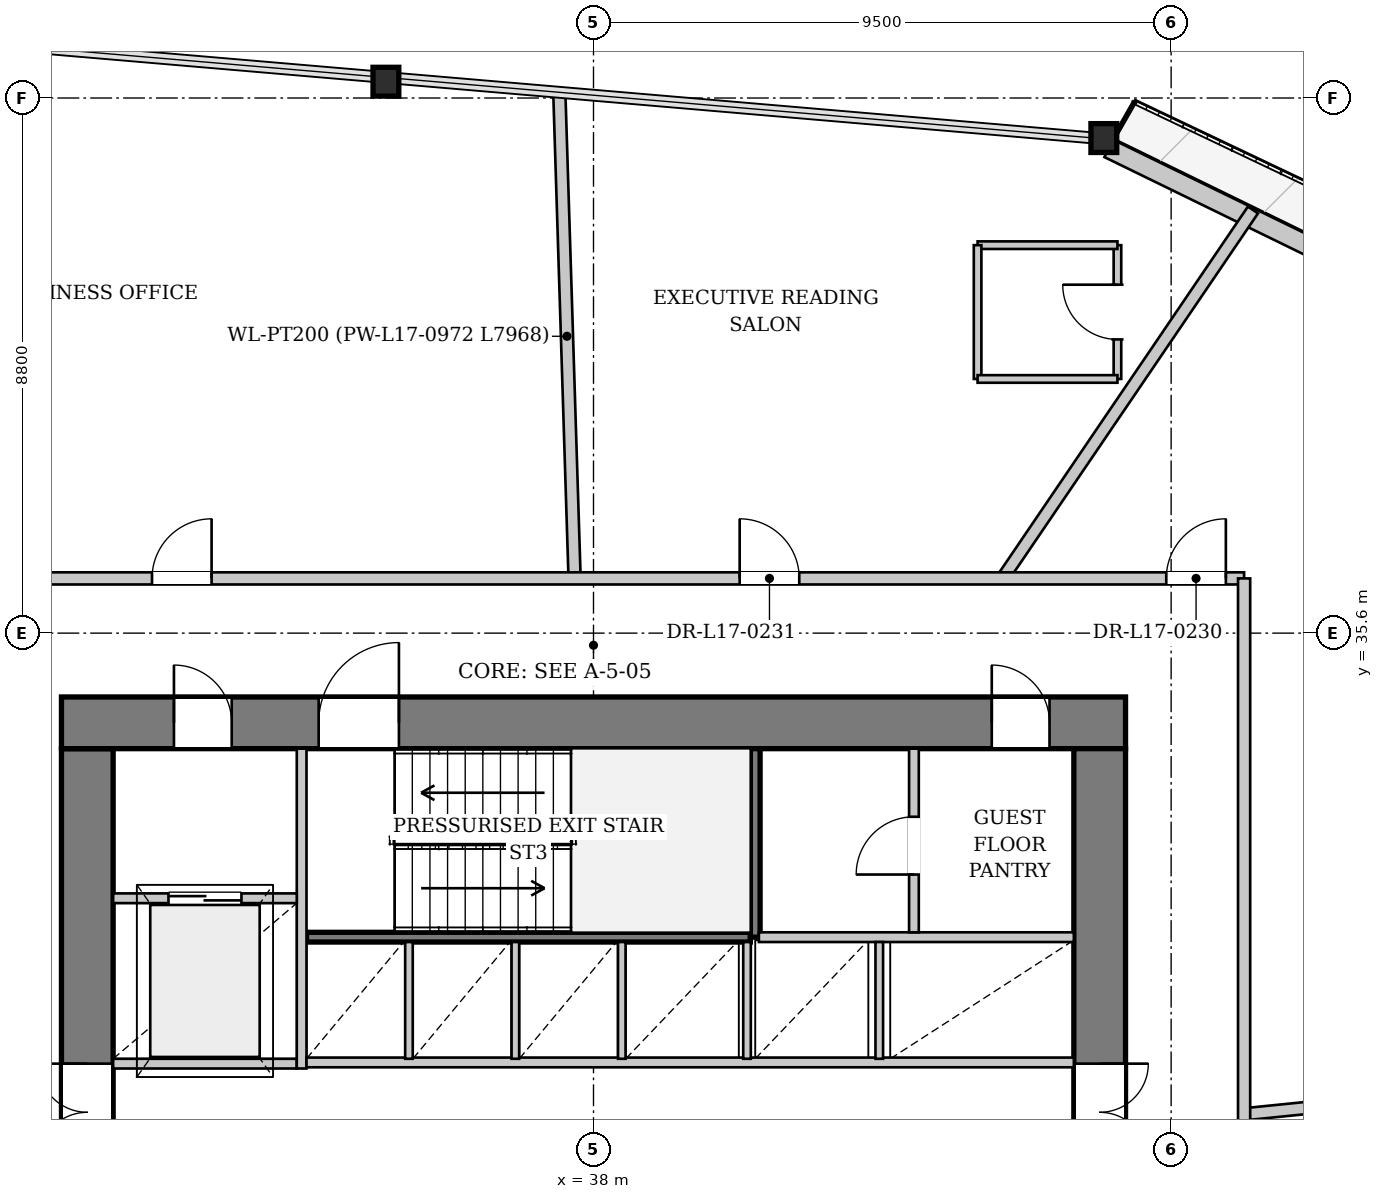
"""IFC4 building model, lengths in metres.
Left out: names, types, materials, properties, quantities, classifications, styles, units other than length and angle.
Written with IfcOpenShell. Run it as: python <this file> out.ifc"""

import sys

from ifc_helpers import new_model, si_unit, direction, frame, frame_2d, origin, origin_2d, place, context, subcontext, project, spatial, rectangle, i_section, extrude, source, transform, mapped, element, fill, save


model = new_model("IFC4")
c1 = context("Model", 3, precision=1e-05, world=origin(), true_north=direction((0.0, 1.0)))
c2 = subcontext(c1, "Body", "Model", "MODEL_VIEW")
j1 = project(units=[si_unit("LENGTHUNIT", "METRE"), si_unit("PLANEANGLEUNIT", "RADIAN")], contexts=[c1])
p1 = place(None, origin())
s1 = spatial("IfcSite", under=j1, at=p1, CompositionType="ELEMENT")
p2 = place(p1, origin())
s2 = spatial("IfcBuilding", under=s1, at=p2, CompositionType="ELEMENT")
p3 = place(p2, frame((0.0, 0.0, 68.35)))
s3 = spatial("IfcBuildingStorey", under=s2, at=p3, CompositionType="ELEMENT", Elevation=68.35)
m1 = source(origin(), c2, "Body", "SweptSolid", [
    extrude(i_section(OverallWidth=0.424, OverallDepth=0.474, WebThickness=0.043, FlangeThickness=0.068, at=origin_2d()), origin(), (0.0, 0.0, 1.0), 3.399),
])
p4 = place(p3, frame((46.543, 43.716, 0.0), z_axis=(-0.088355592773, 0.01501326739, 0.995975848617), x_axis=(-0.167517592781, -0.985869086699, 0.0)))
e1 = element("IfcColumn", 1, at=p4, inside=s3, PredefinedType="COLUMN", context=c2, shape_type="MappedRepresentation", body=[
    mapped(m1, transform((0.0, 0.0, 0.0), x_axis=(1.0, 0.0, 0.0), y_axis=(0.0, 1.0, 0.0), z_axis=(0.0, 0.0, 1.0), scale=1.0)),
])
m2 = source(origin(), c2, "Body", "SweptSolid", [
    extrude(i_section(OverallWidth=0.424, OverallDepth=0.474, WebThickness=0.043, FlangeThickness=0.068, at=origin_2d()), origin(), (0.0, 0.0, 1.0), 3.4),
])
p5 = place(p3, frame((34.734, 44.725, 0.0), z_axis=(-0.087319185608, -0.033247354389, 0.995625418142), x_axis=(0.355835526265, -0.93454859598, 0.0)))
e2 = element("IfcColumn", 2, at=p5, inside=s3, PredefinedType="COLUMN", context=c2, shape_type="MappedRepresentation", body=[
    mapped(m2, transform((0.0, 0.0, 0.0), x_axis=(1.0, 0.0, 0.0), y_axis=(0.0, 1.0, 0.0), z_axis=(0.0, 0.0, 1.0), scale=1.0)),
])
p6 = place(p3, frame((46.473, 43.572, 0.0), z_axis=(0.0, 0.0, 1.0), x_axis=(0.898719243612, -0.438524481827, 0.0)))
e3 = element("IfcWall", 3, at=p6, inside=s3, PredefinedType="SOLIDWALL", context=c2, shape_type="SweptSolid", body=[
    extrude(rectangle(XDim=23.704, YDim=0.32, at=frame_2d((11.852, 0.0))), origin(), (0.0, 0.0, 1.0), 2.592),
])
p7 = place(p6, frame((7.035, 0.0, 0.0)))
e4 = element("IfcOpeningElement", 4, at=p7, cuts=e3, PredefinedType="OPENING", context=c2, shape_type="SweptSolid", body=[
    extrude(rectangle(XDim=1.1, YDim=2.3, at=frame_2d((0.55, 1.15))), frame((0.0, 0.17, 0.0), z_axis=(0.0, -1.0, 0.0), x_axis=(1.0, 0.0, 0.0)), (0.0, 0.0, 1.0), 0.34),
])
p8 = place(p6, frame((16.641, 0.0, 0.272)))
e5 = element("IfcOpeningElement", 5, at=p8, cuts=e3, PredefinedType="OPENING", context=c2, shape_type="SweptSolid", body=[
    extrude(rectangle(XDim=1.8, YDim=2.2, at=frame_2d((0.9, 1.1))), frame((0.0, 0.17, 0.0), z_axis=(0.0, -1.0, 0.0), x_axis=(1.0, 0.0, 0.0)), (0.0, 0.0, 1.0), 0.34),
])
p9 = place(p3, frame((29.675, 19.5, 0.0), z_axis=(0.0, 0.0, 1.0), x_axis=(0.0, 1.0, 0.0)))
e6 = element("IfcWall", 6, at=p9, inside=s3, PredefinedType="SHEAR", context=c2, shape_type="SweptSolid", body=[
    extrude(rectangle(XDim=14.2, YDim=0.85, at=frame_2d((7.1, 0.0))), origin(), (0.0, 0.0, 1.0), 3.3),
])
p10 = place(p9, frame((7.42, 0.0, 0.0)))
e7 = element("IfcOpeningElement", 7, at=p10, cuts=e6, PredefinedType="OPENING", context=c2, shape_type="SweptSolid", body=[
    extrude(rectangle(XDim=1.6, YDim=2.2, at=frame_2d((0.8, 1.1))), frame((0.0, 0.435, 0.0), z_axis=(0.0, -1.0, 0.0), x_axis=(1.0, 0.0, 0.0)), (0.0, 0.0, 1.0), 0.87),
])
p11 = place(p3, frame((29.25, 34.125, 0.0), z_axis=(0.0, 0.0, 1.0), x_axis=(1.0, 0.0, 0.0)))
e8 = element("IfcWall", 8, at=p11, inside=s3, PredefinedType="SHEAR", context=c2, shape_type="SweptSolid", body=[
    extrude(rectangle(XDim=17.5, YDim=0.85, at=frame_2d((8.75, 0.0))), origin(), (0.0, 0.0, 1.0), 3.3),
])
p12 = place(p11, frame((1.85, 0.0, 0.0)))
e9 = element("IfcOpeningElement", 9, at=p12, cuts=e8, PredefinedType="OPENING", context=c2, shape_type="SweptSolid", body=[
    extrude(rectangle(XDim=0.95, YDim=2.1, at=frame_2d((0.475, 1.05))), frame((0.0, 0.435, 0.0), z_axis=(0.0, -1.0, 0.0), x_axis=(1.0, 0.0, 0.0)), (0.0, 0.0, 1.0), 0.87),
])
p13 = place(p11, frame((4.23, 0.0, 0.0)))
e10 = element("IfcOpeningElement", 10, at=p13, cuts=e8, PredefinedType="OPENING", context=c2, shape_type="SweptSolid", body=[
    extrude(rectangle(XDim=1.32, YDim=2.2, at=frame_2d((0.66, 1.1))), frame((0.0, 0.435, 0.0), z_axis=(0.0, -1.0, 0.0), x_axis=(1.0, 0.0, 0.0)), (0.0, 0.0, 1.0), 0.87),
])
p14 = place(p11, frame((15.3, 0.0, 0.0)))
e11 = element("IfcOpeningElement", 11, at=p14, cuts=e8, PredefinedType="OPENING", context=c2, shape_type="SweptSolid", body=[
    extrude(rectangle(XDim=0.95, YDim=2.1, at=frame_2d((0.475, 1.05))), frame((0.0, 0.435, 0.0), z_axis=(0.0, -1.0, 0.0), x_axis=(1.0, 0.0, 0.0)), (0.0, 0.0, 1.0), 0.87),
])
p15 = place(p3, frame((46.325, 33.7, 0.0), z_axis=(0.0, 0.0, 1.0), x_axis=(0.0, -1.0, 0.0)))
e12 = element("IfcWall", 12, at=p15, inside=s3, PredefinedType="SHEAR", context=c2, shape_type="SweptSolid", body=[
    extrude(rectangle(XDim=14.2, YDim=0.85, at=frame_2d((7.1, 0.0))), origin(), (0.0, 0.0, 1.0), 3.3),
])
p16 = place(p15, frame((5.18, 0.0, 0.0)))
e13 = element("IfcOpeningElement", 13, at=p16, cuts=e12, PredefinedType="OPENING", context=c2, shape_type="SweptSolid", body=[
    extrude(rectangle(XDim=1.6, YDim=2.2, at=frame_2d((0.8, 1.1))), frame((0.0, 0.435, 0.0), z_axis=(0.0, -1.0, 0.0), x_axis=(1.0, 0.0, 0.0)), (0.0, 0.0, 1.0), 0.87),
])
p17 = place(p3, frame((33.28, 30.6, 0.0), z_axis=(0.0, 0.0, 1.0), x_axis=(1.0, 0.0, 0.0)))
e14 = element("IfcWall", 14, at=p17, inside=s3, PredefinedType="PARTITIONING", context=c2, shape_type="SweptSolid", body=[
    extrude(rectangle(XDim=7.3, YDim=0.16, at=frame_2d((3.65, 0.0))), origin(), (0.0, 0.0, 1.0), 3.3),
])
p18 = place(p3, frame((40.66, 30.6, 0.0), z_axis=(0.0, 0.0, 1.0), x_axis=(0.0, 1.0, 0.0)))
e15 = element("IfcWall", 15, at=p18, inside=s3, PredefinedType="PARTITIONING", context=c2, shape_type="SweptSolid", body=[
    extrude(rectangle(XDim=3.1, YDim=0.16, at=frame_2d((1.55, 0.0))), origin(), (0.0, 0.0, 1.0), 3.3),
])
p19 = place(p3, frame((30.1, 28.52, 0.0), z_axis=(0.0, 0.0, 1.0), x_axis=(1.0, 0.0, 0.0)))
e16 = element("IfcWall", 16, at=p19, inside=s3, PredefinedType="PARTITIONING", context=c2, shape_type="SweptSolid", body=[
    extrude(rectangle(XDim=3.02, YDim=0.16, at=frame_2d((1.51, 0.0))), origin(), (0.0, 0.0, 1.0), 3.3),
])
p20 = place(p3, frame((33.2, 28.44, 0.0), z_axis=(0.0, 0.0, 1.0), x_axis=(0.0, 1.0, 0.0)))
e17 = element("IfcWall", 17, at=p20, inside=s3, PredefinedType="PARTITIONING", context=c2, shape_type="SweptSolid", body=[
    extrude(rectangle(XDim=5.26, YDim=0.16, at=frame_2d((2.63, 0.0))), origin(), (0.0, 0.0, 1.0), 3.3),
])
p21 = place(p3, frame((30.1, 31.24, 0.0), z_axis=(0.0, 0.0, 1.0), x_axis=(1.0, 0.0, 0.0)))
e18 = element("IfcWall", 18, at=p21, inside=s3, PredefinedType="PARTITIONING", context=c2, shape_type="SweptSolid", body=[
    extrude(rectangle(XDim=3.02, YDim=0.16, at=frame_2d((1.51, 0.0))), origin(), (0.0, 0.0, 1.0), 3.3),
])
p22 = place(p21, frame((0.91, 0.0, 0.0)))
e19 = element("IfcOpeningElement", 19, at=p22, cuts=e18, PredefinedType="OPENING", context=c2, shape_type="SweptSolid", body=[
    extrude(rectangle(XDim=1.2, YDim=2.2, at=frame_2d((0.6, 1.1))), frame((0.0, 0.09, 0.0), z_axis=(0.0, -1.0, 0.0), x_axis=(1.0, 0.0, 0.0)), (0.0, 0.0, 1.0), 0.18),
])
p23 = place(p3, frame((33.28, 28.54, 0.0), z_axis=(0.0, 0.0, 1.0), x_axis=(1.0, 0.0, 0.0)))
e20 = element("IfcWall", 20, at=p23, inside=s3, PredefinedType="PARTITIONING", context=c2, shape_type="SweptSolid", body=[
    extrude(rectangle(XDim=12.62, YDim=0.16, at=frame_2d((6.31, 0.0))), origin(), (0.0, 0.0, 1.0), 3.3),
])
p24 = place(p3, frame((40.72, 30.6, 0.0), z_axis=(0.0, 0.0, 1.0), x_axis=(1.0, 0.0, 0.0)))
e21 = element("IfcWall", 21, at=p24, inside=s3, PredefinedType="PARTITIONING", context=c2, shape_type="SweptSolid", body=[
    extrude(rectangle(XDim=5.18, YDim=0.16, at=frame_2d((2.59, 0.0))), origin(), (0.0, 0.0, 1.0), 3.3),
])
for number, where, z_axis, x_axis in (
    (22, (34.965, 28.6, 0.0), (0.0, 0.0, 1.0), (0.0, 1.0, 0.0)),
    (23, (36.715, 28.6, 0.0), (0.0, 0.0, 1.0), (0.0, 1.0, 0.0)),
    (24, (38.465, 28.6, 0.0), (0.0, 0.0, 1.0), (0.0, 1.0, 0.0)),
    (25, (40.525, 28.6, 0.0), (0.0, 0.0, 1.0), (0.0, 1.0, 0.0)),
    (26, (42.7, 28.6, 0.0), (0.0, 0.0, 1.0), (0.0, 1.0, 0.0)),
):
    element("IfcWall", number, at=place(p3, frame(where, z_axis=z_axis, x_axis=x_axis)), inside=s3, PredefinedType="PARTITIONING", context=c2, shape_type="SweptSolid", body=[
        extrude(rectangle(XDim=1.92, YDim=0.125, at=frame_2d((0.96, 0.0))), origin(), (0.0, 0.0, 1.0), 3.3),
    ])
p25 = place(p3, frame((43.27, 30.68, 0.0), z_axis=(0.0, 0.0, 1.0), x_axis=(0.0, 1.0, 0.0)))
e27 = element("IfcWall", 27, at=p25, inside=s3, PredefinedType="PARTITIONING", context=c2, shape_type="SweptSolid", body=[
    extrude(rectangle(XDim=3.02, YDim=0.16, at=frame_2d((1.51, 0.0))), origin(), (0.0, 0.0, 1.0), 3.3),
])
p26 = place(p25, frame((0.95, 0.0, 0.0)))
e28 = element("IfcOpeningElement", 28, at=p26, cuts=e27, PredefinedType="OPENING", context=c2, shape_type="SweptSolid", body=[
    extrude(rectangle(XDim=0.95, YDim=2.1, at=frame_2d((0.475, 1.05))), frame((0.0, 0.09, 0.0), z_axis=(0.0, -1.0, 0.0), x_axis=(1.0, 0.0, 0.0)), (0.0, 0.0, 1.0), 0.18),
])
p27 = place(p3, frame((37.689, 36.5, 0.0), z_axis=(0.0, 0.0, 1.0), x_axis=(-0.031407900808, 0.999506650186, 0.0)))
e29 = element("IfcWall", 29, at=p27, inside=s3, PredefinedType="PARTITIONING", context=c2, shape_type="SweptSolid", body=[
    extrude(rectangle(XDim=7.968, YDim=0.2, at=frame_2d((3.984, 0.0))), origin(), (0.0, 0.0, 1.0), 3.3),
])
p28 = place(p3, frame((48.7, 27.687, 0.0), z_axis=(0.0, 0.0, 1.0), x_axis=(0.99488143762, 0.101049122113, 0.0)))
e30 = element("IfcWall", 30, at=p28, inside=s3, PredefinedType="PARTITIONING", context=c2, shape_type="SweptSolid", body=[
    extrude(rectangle(XDim=20.911, YDim=0.2, at=frame_2d((10.456, 0.0))), origin(), (0.0, 0.0, 1.0), 2.795),
])
p29 = place(p3, frame((44.728, 36.5, 0.0), z_axis=(0.0, 0.0, 1.0), x_axis=(0.562076643958, 0.827085150584, 0.0)))
e31 = element("IfcWall", 31, at=p29, inside=s3, PredefinedType="PARTITIONING", context=c2, shape_type="SweptSolid", body=[
    extrude(rectangle(XDim=7.326, YDim=0.2, at=frame_2d((3.663, 0.0))), origin(), (0.0, 0.0, 1.0), 3.3),
])
p30 = place(p3, frame((46.617, 39.78, 0.0), z_axis=(0.0, 0.0, 1.0), x_axis=(0.0, 1.0, 0.0)))
e32 = element("IfcWall", 32, at=p30, inside=s3, PredefinedType="PARTITIONING", context=c2, shape_type="SweptSolid", body=[
    extrude(rectangle(XDim=2.2, YDim=0.125, at=frame_2d((1.1, 0.0))), origin(), (0.0, 0.0, 1.0), 3.3),
])
p31 = place(p30, frame((0.65, 0.0, 0.0)))
e33 = element("IfcOpeningElement", 33, at=p31, cuts=e32, PredefinedType="OPENING", context=c2, shape_type="SweptSolid", body=[
    extrude(rectangle(XDim=0.9, YDim=2.1, at=frame_2d((0.45, 1.05))), frame((0.0, 0.073, 0.0), z_axis=(0.0, -1.0, 0.0), x_axis=(1.0, 0.0, 0.0)), (0.0, 0.0, 1.0), 0.145),
])
p32 = place(p3, frame((46.617, 41.98, 0.0), z_axis=(0.0, 0.0, 1.0), x_axis=(-1.0, 0.0, 0.0)))
e34 = element("IfcWall", 34, at=p32, inside=s3, PredefinedType="PARTITIONING", context=c2, shape_type="SweptSolid", body=[
    extrude(rectangle(XDim=2.3, YDim=0.125, at=frame_2d((1.15, 0.0))), origin(), (0.0, 0.0, 1.0), 3.3),
])
p33 = place(p3, frame((44.317, 41.98, 0.0), z_axis=(0.0, 0.0, 1.0), x_axis=(0.0, -1.0, 0.0)))
e35 = element("IfcWall", 35, at=p33, inside=s3, PredefinedType="PARTITIONING", context=c2, shape_type="SweptSolid", body=[
    extrude(rectangle(XDim=2.2, YDim=0.125, at=frame_2d((1.1, 0.0))), origin(), (0.0, 0.0, 1.0), 2.785),
])
p34 = place(p3, frame((44.317, 39.78, 0.0), z_axis=(0.0, 0.0, 1.0), x_axis=(1.0, 0.0, 0.0)))
e36 = element("IfcWall", 36, at=p34, inside=s3, PredefinedType="PARTITIONING", context=c2, shape_type="SweptSolid", body=[
    extrude(rectangle(XDim=2.3, YDim=0.125, at=frame_2d((1.15, 0.0))), origin(), (0.0, 0.0, 1.0), 3.3),
])
p35 = place(p3, frame((27.3, 36.5, 0.0), z_axis=(0.0, 0.0, 1.0), x_axis=(1.0, 0.0, 0.0)))
e37 = element("IfcWall", 37, at=p35, inside=s3, PredefinedType="PARTITIONING", context=c2, shape_type="SweptSolid", body=[
    extrude(rectangle(XDim=21.4, YDim=0.2, at=frame_2d((10.7, 0.0))), origin(), (0.0, 0.0, 1.0), 3.3),
])
p36 = place(p35, frame((3.439, 0.0, 0.0)))
e38 = element("IfcOpeningElement", 38, at=p36, cuts=e37, PredefinedType="OPENING", context=c2, shape_type="SweptSolid", body=[
    extrude(rectangle(XDim=0.98, YDim=2.15, at=frame_2d((0.49, 1.075))), frame((0.0, 0.11, 0.0), z_axis=(0.0, -1.0, 0.0), x_axis=(1.0, 0.0, 0.0)), (0.0, 0.0, 1.0), 0.22),
])
p37 = place(p35, frame((20.12, 0.0, 0.0)))
e39 = element("IfcOpeningElement", 39, at=p37, cuts=e37, PredefinedType="OPENING", context=c2, shape_type="SweptSolid", body=[
    extrude(rectangle(XDim=0.98, YDim=2.15, at=frame_2d((0.49, 1.075))), frame((0.0, 0.11, 0.0), z_axis=(0.0, -1.0, 0.0), x_axis=(1.0, 0.0, 0.0)), (0.0, 0.0, 1.0), 0.22),
])
p38 = place(p35, frame((13.104, 0.0, 0.0)))
e40 = element("IfcOpeningElement", 40, at=p38, cuts=e37, PredefinedType="OPENING", context=c2, shape_type="SweptSolid", body=[
    extrude(rectangle(XDim=0.98, YDim=2.15, at=frame_2d((0.49, 1.075))), frame((0.0, 0.11, 0.0), z_axis=(0.0, -1.0, 0.0), x_axis=(1.0, 0.0, 0.0)), (0.0, 0.0, 1.0), 0.22),
])
p39 = place(p3, frame((48.7, 16.7, 0.0), z_axis=(0.0, 0.0, 1.0), x_axis=(0.0, 1.0, 0.0)))
e41 = element("IfcWall", 41, at=p39, inside=s3, PredefinedType="PARTITIONING", context=c2, shape_type="SweptSolid", body=[
    extrude(rectangle(XDim=19.8, YDim=0.2, at=frame_2d((9.9, 0.0))), origin(), (0.0, 0.0, 1.0), 3.3),
])
p40 = place(p39, frame((4.413, 0.0, 0.0)))
e42 = element("IfcOpeningElement", 42, at=p40, cuts=e41, PredefinedType="OPENING", context=c2, shape_type="SweptSolid", body=[
    extrude(rectangle(XDim=0.98, YDim=2.15, at=frame_2d((0.49, 1.075))), frame((0.0, 0.11, 0.0), z_axis=(0.0, -1.0, 0.0), x_axis=(1.0, 0.0, 0.0)), (0.0, 0.0, 1.0), 0.22),
])
m3 = source(origin(), c2, "Body", "SweptSolid", [
    extrude(rectangle(XDim=1.6, YDim=2.2, at=frame_2d((0.8, 1.1))), frame((0.0, 0.025, 0.0), z_axis=(0.0, -1.0, 0.0), x_axis=(1.0, 0.0, 0.0)), (0.0, 0.0, 1.0), 0.05),
])
p41 = place(p10, origin())
e43 = element("IfcDoor", 43, at=p41, inside=s3, OperationType="DOUBLE_DOOR_SINGLE_SWING", PredefinedType="DOOR", context=c2, shape_type="MappedRepresentation", body=[
    mapped(m3, transform((0.0, 0.0, 0.0), x_axis=(1.0, 0.0, 0.0), y_axis=(0.0, 1.0, 0.0), z_axis=(0.0, 0.0, 1.0), scale=1.0)),
])
fill(e7, e43)
m4 = source(origin(), c2, "Body", "SweptSolid", [
    extrude(rectangle(XDim=0.95, YDim=2.1, at=frame_2d((0.475, 1.05))), frame((0.0, 0.025, 0.0), z_axis=(0.0, -1.0, 0.0), x_axis=(1.0, 0.0, 0.0)), (0.0, 0.0, 1.0), 0.05),
])
p42 = place(p12, origin())
e44 = element("IfcDoor", 44, at=p42, inside=s3, OperationType="SINGLE_SWING_LEFT", PredefinedType="DOOR", context=c2, shape_type="MappedRepresentation", body=[
    mapped(m4, transform((0.0, 0.0, 0.0), x_axis=(1.0, 0.0, 0.0), y_axis=(0.0, 1.0, 0.0), z_axis=(0.0, 0.0, 1.0), scale=1.0)),
])
fill(e9, e44)
m5 = source(origin(), c2, "Body", "SweptSolid", [
    extrude(rectangle(XDim=1.32, YDim=2.2, at=frame_2d((0.66, 1.1))), frame((0.0, 0.025, 0.0), z_axis=(0.0, -1.0, 0.0), x_axis=(1.0, 0.0, 0.0)), (0.0, 0.0, 1.0), 0.05),
])
p43 = place(p13, origin())
e45 = element("IfcDoor", 45, at=p43, inside=s3, OperationType="SINGLE_SWING_RIGHT", PredefinedType="DOOR", context=c2, shape_type="MappedRepresentation", body=[
    mapped(m5, transform((0.0, 0.0, 0.0), x_axis=(1.0, 0.0, 0.0), y_axis=(0.0, 1.0, 0.0), z_axis=(0.0, 0.0, 1.0), scale=1.0)),
])
fill(e10, e45)
p44 = place(p16, origin())
e46 = element("IfcDoor", 46, at=p44, inside=s3, OperationType="DOUBLE_DOOR_SINGLE_SWING", PredefinedType="DOOR", context=c2, shape_type="MappedRepresentation", body=[
    mapped(m3, transform((0.0, 0.0, 0.0), x_axis=(1.0, 0.0, 0.0), y_axis=(0.0, 1.0, 0.0), z_axis=(0.0, 0.0, 1.0), scale=1.0)),
])
fill(e13, e46)
m6 = source(origin(), c2, "Body", "SweptSolid", [
    extrude(rectangle(XDim=1.2, YDim=2.2, at=frame_2d((0.6, 1.1))), frame((0.0, 0.025, 0.0), z_axis=(0.0, -1.0, 0.0), x_axis=(1.0, 0.0, 0.0)), (0.0, 0.0, 1.0), 0.05),
])
p45 = place(p22, origin())
e47 = element("IfcDoor", 47, at=p45, inside=s3, OperationType="DOUBLE_DOOR_SLIDING", PredefinedType="DOOR", context=c2, shape_type="MappedRepresentation", body=[
    mapped(m6, transform((0.0, 0.0, 0.0), x_axis=(1.0, 0.0, 0.0), y_axis=(0.0, 1.0, 0.0), z_axis=(0.0, 0.0, 1.0), scale=1.0)),
])
fill(e19, e47)
p46 = place(p26, origin())
e48 = element("IfcDoor", 48, at=p46, inside=s3, OperationType="SINGLE_SWING_LEFT", PredefinedType="DOOR", context=c2, shape_type="MappedRepresentation", body=[
    mapped(m4, transform((0.0, 0.0, 0.0), x_axis=(1.0, 0.0, 0.0), y_axis=(0.0, 1.0, 0.0), z_axis=(0.0, 0.0, 1.0), scale=1.0)),
])
fill(e28, e48)
p47 = place(p14, origin())
e49 = element("IfcDoor", 49, at=p47, inside=s3, OperationType="SINGLE_SWING_LEFT", PredefinedType="DOOR", context=c2, shape_type="MappedRepresentation", body=[
    mapped(m4, transform((0.0, 0.0, 0.0), x_axis=(1.0, 0.0, 0.0), y_axis=(0.0, 1.0, 0.0), z_axis=(0.0, 0.0, 1.0), scale=1.0)),
])
fill(e11, e49)
m7 = source(origin(), c2, "Body", "SweptSolid", [
    extrude(rectangle(XDim=0.9, YDim=2.1, at=frame_2d((0.45, 1.05))), frame((0.0, 0.025, 0.0), z_axis=(0.0, -1.0, 0.0), x_axis=(1.0, 0.0, 0.0)), (0.0, 0.0, 1.0), 0.05),
])
p48 = place(p31, origin())
e50 = element("IfcDoor", 50, at=p48, inside=s3, OperationType="SINGLE_SWING_RIGHT", PredefinedType="DOOR", context=c2, shape_type="MappedRepresentation", body=[
    mapped(m7, transform((0.0, 0.0, 0.0), x_axis=(1.0, 0.0, 0.0), y_axis=(0.0, 1.0, 0.0), z_axis=(0.0, 0.0, 1.0), scale=1.0)),
])
fill(e33, e50)
m8 = source(origin(), c2, "Body", "SweptSolid", [
    extrude(rectangle(XDim=0.98, YDim=2.15, at=frame_2d((0.49, 1.075))), frame((0.0, 0.025, 0.0), z_axis=(0.0, -1.0, 0.0), x_axis=(1.0, 0.0, 0.0)), (0.0, 0.0, 1.0), 0.05),
])
p49 = place(p36, origin())
e51 = element("IfcDoor", 51, at=p49, inside=s3, OperationType="SINGLE_SWING_RIGHT", PredefinedType="DOOR", context=c2, shape_type="MappedRepresentation", body=[
    mapped(m8, transform((0.0, 0.0, 0.0), x_axis=(1.0, 0.0, 0.0), y_axis=(0.0, 1.0, 0.0), z_axis=(0.0, 0.0, 1.0), scale=1.0)),
])
fill(e38, e51)
p50 = place(p37, origin())
e52 = element("IfcDoor", 52, at=p50, inside=s3, OperationType="SINGLE_SWING_RIGHT", PredefinedType="DOOR", context=c2, shape_type="MappedRepresentation", body=[
    mapped(m8, transform((0.0, 0.0, 0.0), x_axis=(1.0, 0.0, 0.0), y_axis=(0.0, 1.0, 0.0), z_axis=(0.0, 0.0, 1.0), scale=1.0)),
])
fill(e39, e52)
p51 = place(p38, origin())
e53 = element("IfcDoor", 53, at=p51, inside=s3, OperationType="SINGLE_SWING_LEFT", PredefinedType="DOOR", context=c2, shape_type="MappedRepresentation", body=[
    mapped(m8, transform((0.0, 0.0, 0.0), x_axis=(1.0, 0.0, 0.0), y_axis=(0.0, 1.0, 0.0), z_axis=(0.0, 0.0, 1.0), scale=1.0)),
])
fill(e40, e53)
save(model, sys.argv[1])
